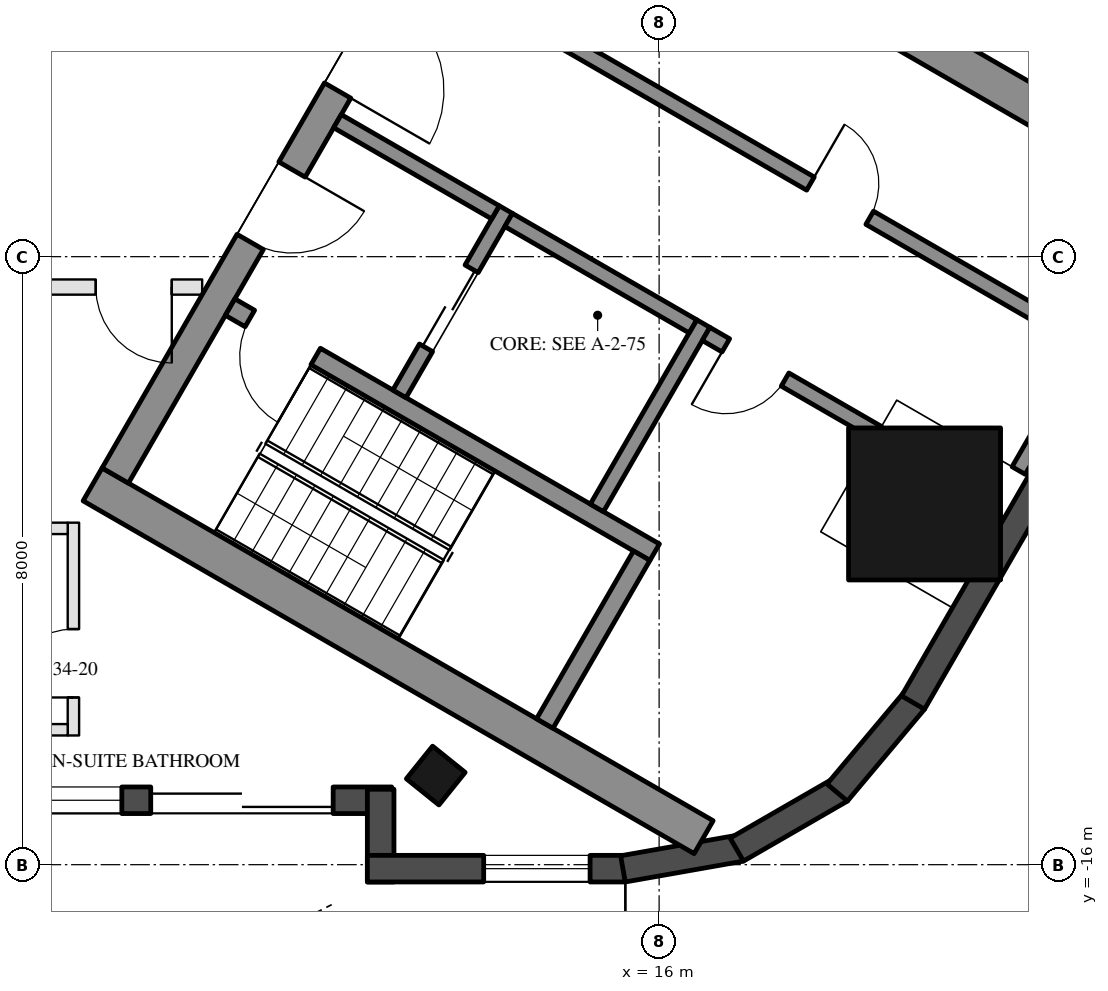
"""IFC4 building model, lengths in metres.
Left out: names, types, materials, properties, quantities, classifications, styles, units other than length and angle.
Written with IfcOpenShell. Run it as: python <this file> out.ifc"""

import sys

from ifc_helpers import new_model, si_unit, direction, frame, frame_2d, origin, origin_2d, place, context, subcontext, project, spatial, rectangle, hollow_rectangle, extrude, boolean, halfspace, element, fill, save


model = new_model("IFC4")
c1 = context("Model", 3, precision=1e-05, world=origin(), true_north=direction((0.0, 1.0)))
c2 = subcontext(c1, "Body", "Model", "MODEL_VIEW")
j1 = project(units=[si_unit("LENGTHUNIT", "METRE"), si_unit("PLANEANGLEUNIT", "RADIAN")], contexts=[c1])
p1 = place(None, origin())
s1 = spatial("IfcSite", under=j1, at=p1, CompositionType="ELEMENT")
p2 = place(p1, origin())
s2 = spatial("IfcBuilding", under=s1, at=p2, CompositionType="ELEMENT")
p3 = place(p2, frame((0.0, 0.0, 320.7)))
s3 = spatial("IfcBuildingStorey", under=s2, at=p3, CompositionType="ELEMENT", Elevation=320.7)
p4 = place(p3, frame((13.061, -14.827, 0.0), z_axis=(-0.121007284992, 0.150336498529, 0.981201393287), x_axis=(0.992609775631, 0.009249858451, 0.120996997646)))
e1 = element("IfcColumn", 1, at=p4, inside=s3, PredefinedType="COLUMN", context=c2, shape_type="SweptSolid", body=[
    boolean("DIFFERENCE", boolean("DIFFERENCE", extrude(hollow_rectangle(XDim=0.55, YDim=0.55, WallThickness=0.025, at=origin_2d()), origin(), (0.0, 0.0, 1.0), 3.771), halfspace(frame((0.0, 0.0, 0.04), z_axis=(0.0, 0.0, 1.0), x_axis=(1.0, 0.0, 0.0)), True)), halfspace(frame((0.0, 0.0, 3.731), z_axis=(0.0, 0.0, 1.0), x_axis=(1.0, 0.0, 0.0)), False)),
])
p5 = place(p3, frame((19.492, -11.254, 0.0), z_axis=(-0.190406849863, 0.109944185114, 0.975529347424), x_axis=(0.500043453909, 0.866000314205, 0.0)))
e2 = element("IfcColumn", 2, at=p5, inside=s3, PredefinedType="COLUMN", context=c2, shape_type="SweptSolid", body=[
    boolean("DIFFERENCE", boolean("DIFFERENCE", extrude(hollow_rectangle(XDim=2.0, YDim=2.0, WallThickness=0.05, at=origin_2d()), origin(), (0.0, 0.0, 1.0), 3.793), halfspace(frame((0.0, 0.0, 0.113), z_axis=(0.0, 0.0, 1.0), x_axis=(1.0, 0.0, 0.0)), True)), halfspace(frame((0.0, 0.0, 3.679), z_axis=(0.0, 0.0, 1.0), x_axis=(1.0, 0.0, 0.0)), False)),
])
p6 = place(p3, frame((7.111, -15.153, 0.0), z_axis=(0.0, 0.0, 1.0), x_axis=(1.0, 0.0, 0.0)))
e3 = element("IfcWall", 3, at=p6, inside=s3, PredefinedType="SOLIDWALL", context=c2, shape_type="SweptSolid", body=[
    extrude(rectangle(XDim=5.371, YDim=0.35, at=frame_2d((2.686, 0.0))), origin(), (0.0, 0.0, 1.0), 3.55),
])
p7 = place(p6, frame((2.201, 0.0, 0.0)))
e4 = element("IfcOpeningElement", 4, at=p7, cuts=e3, PredefinedType="OPENING", context=c2, shape_type="SweptSolid", body=[
    extrude(rectangle(XDim=2.4, YDim=2.4, at=frame_2d((1.2, 1.2))), frame((0.0, 0.185, 0.0), z_axis=(0.0, -1.0, 0.0), x_axis=(1.0, 0.0, 0.0)), (0.0, 0.0, 1.0), 0.37),
])
p8 = place(p6, frame((0.32, 0.0, 0.3)))
e5 = element("IfcOpeningElement", 5, at=p8, cuts=e3, PredefinedType="OPENING", context=c2, shape_type="SweptSolid", body=[
    extrude(rectangle(XDim=1.5, YDim=2.65, at=frame_2d((0.75, 1.325))), frame((0.0, 0.185, 0.0), z_axis=(0.0, -1.0, 0.0), x_axis=(1.0, 0.0, 0.0)), (0.0, 0.0, 1.0), 0.37),
])
p9 = place(p3, frame((12.336, -15.008, 0.0), z_axis=(0.0, 0.0, 1.0), x_axis=(0.0, -1.0, 0.0)))
e6 = element("IfcWall", 6, at=p9, inside=s3, PredefinedType="SOLIDWALL", context=c2, shape_type="SweptSolid", body=[
    extrude(rectangle(XDim=1.22, YDim=0.35, at=frame_2d((0.61, 0.0))), origin(), (0.0, 0.0, 1.0), 3.55),
])
p10 = place(p3, frame((12.161, -16.052, 0.0), z_axis=(0.0, 0.0, 1.0), x_axis=(1.0, 0.0, 0.0)))
e7 = element("IfcWall", 7, at=p10, inside=s3, PredefinedType="SOLIDWALL", context=c2, shape_type="SweptSolid", body=[
    extrude(rectangle(XDim=3.393, YDim=0.35, at=frame_2d((1.697, 0.0))), origin(), (0.0, 0.0, 1.0), 3.55),
])
p11 = place(p10, frame((1.531, 0.0, 0.3)))
e8 = element("IfcOpeningElement", 8, at=p11, cuts=e7, PredefinedType="OPENING", context=c2, shape_type="SweptSolid", body=[
    extrude(rectangle(XDim=1.4, YDim=2.65, at=frame_2d((0.7, 1.325))), frame((0.0, 0.185, 0.0), z_axis=(0.0, -1.0, 0.0), x_axis=(1.0, 0.0, 0.0)), (0.0, 0.0, 1.0), 0.37),
])
for number, where, z_axis, x_axis in (
    (9, (15.524, -16.055, 0.0), (0.0, 0.0, 1.0), (0.985, 0.174, 0.0)),
    (10, (17.022, -15.802, 0.0), (0.0, 0.0, 1.0), (0.866, 0.5, 0.0)),
    (11, (18.343, -15.051, 0.0), (0.0, 0.0, 1.0), (0.643, 0.766, 0.0)),
):
    element("IfcWall", number, at=place(p3, frame(where, z_axis=z_axis, x_axis=x_axis)), inside=s3, PredefinedType="SOLIDWALL", context=c2, shape_type="SweptSolid", body=[
        extrude(rectangle(XDim=1.579, YDim=0.35, at=frame_2d((0.79, 0.0))), origin(), (0.0, 0.0, 1.0), 3.55),
    ])
p12 = place(p3, frame((19.34, -13.867, 0.0), z_axis=(0.0, 0.0, 1.0), x_axis=(0.500023656998, 0.86601174498, 0.0)))
e12 = element("IfcWall", 12, at=p12, inside=s3, PredefinedType="SOLIDWALL", context=c2, shape_type="SweptSolid", body=[
    extrude(rectangle(XDim=4.677, YDim=0.35, at=frame_2d((2.339, 0.0))), origin(), (0.0, 0.0, 1.0), 3.55),
])
p13 = place(p3, frame((21.679, -5.444, 0.0), z_axis=(0.0, 0.0, 1.0), x_axis=(-0.500020587865, 0.866013517049, 0.0)))
e13 = element("IfcWall", 13, at=p13, inside=s3, PredefinedType="SOLIDWALL", context=c2, shape_type="SweptSolid", body=[
    extrude(rectangle(XDim=9.924, YDim=0.35, at=frame_2d((4.962, 0.0))), origin(), (0.0, 0.0, 1.0), 3.55),
])
p14 = place(p13, frame((0.381, 0.0, 0.3)))
e14 = element("IfcOpeningElement", 14, at=p14, cuts=e13, PredefinedType="OPENING", context=c2, shape_type="SweptSolid", body=[
    extrude(rectangle(XDim=1.3, YDim=2.65, at=frame_2d((0.65, 1.325))), frame((0.0, 0.185, 0.0), z_axis=(0.0, -1.0, 0.0), x_axis=(1.0, 0.0, 0.0)), (0.0, 0.0, 1.0), 0.37),
])
p15 = place(p13, frame((5.995, 0.0, 0.0)))
e15 = element("IfcOpeningElement", 15, at=p15, cuts=e13, PredefinedType="OPENING", context=c2, shape_type="SweptSolid", body=[
    extrude(rectangle(XDim=2.4, YDim=2.4, at=frame_2d((1.2, 1.2))), frame((0.0, 0.185, 0.0), z_axis=(0.0, -1.0, 0.0), x_axis=(1.0, 0.0, 0.0)), (0.0, 0.0, 1.0), 0.37),
])
p16 = place(p13, frame((3.579, 0.0, 0.3)))
e16 = element("IfcOpeningElement", 16, at=p16, cuts=e13, PredefinedType="OPENING", context=c2, shape_type="SweptSolid", body=[
    extrude(rectangle(XDim=2.1, YDim=2.65, at=frame_2d((1.05, 1.325))), frame((0.0, 0.185, 0.0), z_axis=(0.0, -1.0, 0.0), x_axis=(1.0, 0.0, 0.0)), (0.0, 0.0, 1.0), 0.37),
])
for number, where, z_axis, x_axis in (
    (17, (8.547, -10.997, 0.0), (0.0, 0.0, 1.0), (0.866, -0.5, 0.0)),
    (18, (13.797, -1.903, 0.0), (0.0, 0.0, 1.0), (0.866, -0.5, 0.0)),
):
    element("IfcWall", number, at=place(p3, frame(where, z_axis=z_axis, x_axis=x_axis)), inside=s3, PredefinedType="SHEAR", context=c2, shape_type="SweptSolid", body=[
        extrude(rectangle(XDim=9.283, YDim=0.5, at=frame_2d((4.641, 0.0))), origin(), (0.0, 0.0, 1.0), 3.5),
    ])
p17 = place(p3, frame((8.845, -10.88, 0.0), z_axis=(0.0, 0.0, 1.0), x_axis=(0.500004234368, 0.866022959057, 0.0)))
e19 = element("IfcWall", 19, at=p17, inside=s3, PredefinedType="SHEAR", context=c2, shape_type="SweptSolid", body=[
    extrude(rectangle(XDim=10.0, YDim=0.4, at=frame_2d((5.0, 0.0))), origin(), (0.0, 0.0, 1.0), 3.5),
])
p18 = place(p17, frame((3.55, 0.0, 0.0)))
e20 = element("IfcOpeningElement", 20, at=p18, cuts=e19, PredefinedType="OPENING", context=c2, shape_type="SweptSolid", body=[
    extrude(rectangle(XDim=1.1, YDim=2.1, at=frame_2d((0.55, 1.05))), frame((0.0, 0.21, 0.0), z_axis=(0.0, -1.0, 0.0), x_axis=(1.0, 0.0, 0.0)), (0.0, 0.0, 1.0), 0.42),
])
p19 = place(p17, frame((5.85, 0.0, 0.0)))
e21 = element("IfcOpeningElement", 21, at=p19, cuts=e19, PredefinedType="OPENING", context=c2, shape_type="SweptSolid", body=[
    extrude(rectangle(XDim=1.4, YDim=2.1, at=frame_2d((0.7, 1.05))), frame((0.0, 0.21, 0.0), z_axis=(0.0, -1.0, 0.0), x_axis=(1.0, 0.0, 0.0)), (0.0, 0.0, 1.0), 0.42),
])
p20 = place(p3, frame((10.356, -8.664, 0.0), z_axis=(0.0, 0.0, 1.0), x_axis=(0.866028629588, -0.499994412703, 0.0)))
e22 = element("IfcWall", 22, at=p20, inside=s3, PredefinedType="SHEAR", context=c2, shape_type="SweptSolid", body=[
    extrude(rectangle(XDim=6.45, YDim=0.25, at=frame_2d((3.225, 0.0))), origin(), (0.0, 0.0, 1.0), 3.5),
])
p21 = place(p20, frame((0.3, 0.0, 0.0)))
e23 = element("IfcOpeningElement", 23, at=p21, cuts=e22, PredefinedType="OPENING", context=c2, shape_type="SweptSolid", body=[
    extrude(rectangle(XDim=1.0, YDim=2.1, at=frame_2d((0.5, 1.05))), frame((0.0, 0.135, 0.0), z_axis=(0.0, -1.0, 0.0), x_axis=(1.0, 0.0, 0.0)), (0.0, 0.0, 1.0), 0.27),
])
p22 = place(p3, frame((14.496, -14.143, 0.0), z_axis=(0.0, 0.0, 1.0), x_axis=(0.500062241894, 0.865989465428, 0.0)))
e24 = element("IfcWall", 24, at=p22, inside=s3, PredefinedType="SHEAR", context=c2, shape_type="SweptSolid", body=[
    extrude(rectangle(XDim=2.55, YDim=0.25, at=frame_2d((1.275, 0.0))), origin(), (0.0, 0.0, 1.0), 3.5),
])
p23 = place(p3, frame((15.181, -11.305, 0.0), z_axis=(0.0, 0.0, 1.0), x_axis=(0.49994636267, 0.866056369097, 0.0)))
e25 = element("IfcWall", 25, at=p23, inside=s3, PredefinedType="SHEAR", context=c2, shape_type="SweptSolid", body=[
    extrude(rectangle(XDim=2.8, YDim=0.2, at=frame_2d((1.4, 0.0))), origin(), (0.0, 0.0, 1.0), 3.5),
])
p24 = place(p3, frame((12.583, -9.805, 0.0), z_axis=(0.0, 0.0, 1.0), x_axis=(0.49994636267, 0.866056369097, 0.0)))
e26 = element("IfcWall", 26, at=p24, inside=s3, PredefinedType="SHEAR", context=c2, shape_type="SweptSolid", body=[
    extrude(rectangle(XDim=2.8, YDim=0.2, at=frame_2d((1.4, 0.0))), origin(), (0.0, 0.0, 1.0), 3.5),
])
p25 = place(p24, frame((0.7, 0.0, 0.0)))
e27 = element("IfcOpeningElement", 27, at=p25, cuts=e26, PredefinedType="OPENING", context=c2, shape_type="SweptSolid", body=[
    extrude(rectangle(XDim=1.2, YDim=2.1, at=frame_2d((0.6, 1.05))), frame((0.0, 0.11, 0.0), z_axis=(0.0, -1.0, 0.0), x_axis=(1.0, 0.0, 0.0)), (0.0, 0.0, 1.0), 0.22),
])
p26 = place(p3, frame((11.768, -6.217, 0.0), z_axis=(0.0, 0.0, 1.0), x_axis=(0.866050077142, -0.499957262057, 0.0)))
e28 = element("IfcWall", 28, at=p26, inside=s3, PredefinedType="SHEAR", context=c2, shape_type="SweptSolid", body=[
    extrude(rectangle(XDim=2.4, YDim=0.2, at=frame_2d((1.2, 0.0))), origin(), (0.0, 0.0, 1.0), 3.5),
])
p27 = place(p3, frame((14.02, -7.517, 0.0), z_axis=(0.0, 0.0, 1.0), x_axis=(0.866034573852, -0.49998411664, 0.0)))
e29 = element("IfcWall", 29, at=p27, inside=s3, PredefinedType="SHEAR", context=c2, shape_type="SweptSolid", body=[
    extrude(rectangle(XDim=2.8, YDim=0.2, at=frame_2d((1.4, 0.0))), origin(), (0.0, 0.0, 1.0), 3.5),
])
p28 = place(p3, frame((12.968, -4.138, 0.0), z_axis=(0.0, 0.0, 1.0), x_axis=(0.866025710499, -0.499999468754, 0.0)))
e30 = element("IfcWall", 30, at=p28, inside=s3, PredefinedType="SHEAR", context=c2, shape_type="SweptSolid", body=[
    extrude(rectangle(XDim=10.121, YDim=0.2, at=frame_2d((5.061, 0.0))), origin(), (0.0, 0.0, 1.0), 3.5),
])
p29 = place(p28, frame((0.62, 0.0, 0.0)))
e31 = element("IfcOpeningElement", 31, at=p29, cuts=e30, PredefinedType="OPENING", context=c2, shape_type="SweptSolid", body=[
    extrude(rectangle(XDim=1.1, YDim=2.1, at=frame_2d((0.55, 1.05))), frame((0.0, 0.11, 0.0), z_axis=(0.0, -1.0, 0.0), x_axis=(1.0, 0.0, 0.0)), (0.0, 0.0, 1.0), 0.22),
])
p30 = place(p28, frame((5.8, 0.0, 0.0)))
e32 = element("IfcOpeningElement", 32, at=p30, cuts=e30, PredefinedType="OPENING", context=c2, shape_type="SweptSolid", body=[
    extrude(rectangle(XDim=0.9, YDim=2.1, at=frame_2d((0.45, 1.05))), frame((0.0, 0.11, 0.0), z_axis=(0.0, -1.0, 0.0), x_axis=(1.0, 0.0, 0.0)), (0.0, 0.0, 1.0), 0.22),
])
p31 = place(p3, frame((20.73, -10.814, 0.0), z_axis=(0.0, 0.0, 1.0), x_axis=(0.499961193289, 0.866047807691, 0.0)))
e33 = element("IfcWall", 33, at=p31, inside=s3, PredefinedType="SHEAR", context=c2, shape_type="SweptSolid", body=[
    extrude(rectangle(XDim=1.8, YDim=0.2, at=frame_2d((0.9, 0.0))), origin(), (0.0, 0.0, 1.0), 3.5),
])
p32 = place(p3, frame((16.618, -9.017, 0.0), z_axis=(0.0, 0.0, 1.0), x_axis=(0.866045268016, -0.499965592563, 0.0)))
e34 = element("IfcWall", 34, at=p32, inside=s3, PredefinedType="SHEAR", context=c2, shape_type="SweptSolid", body=[
    extrude(rectangle(XDim=2.608, YDim=0.2, at=frame_2d((1.304, 0.0))), origin(), (0.0, 0.0, 1.0), 3.5),
])
p33 = place(p32, frame((0.3, 0.0, 0.0)))
e35 = element("IfcOpeningElement", 35, at=p33, cuts=e34, PredefinedType="OPENING", context=c2, shape_type="SweptSolid", body=[
    extrude(rectangle(XDim=0.9, YDim=2.1, at=frame_2d((0.45, 1.05))), frame((0.0, 0.11, 0.0), z_axis=(0.0, -1.0, 0.0), x_axis=(1.0, 0.0, 0.0)), (0.0, 0.0, 1.0), 0.22),
])
p34 = place(p3, frame((15.131, -5.272, 0.0), z_axis=(0.0, 0.0, 1.0), x_axis=(0.499972520799, 0.866041268327, 0.0)))
e36 = element("IfcWall", 36, at=p34, inside=s3, PredefinedType="SHEAR", context=c2, shape_type="SweptSolid", body=[
    extrude(rectangle(XDim=2.0, YDim=0.2, at=frame_2d((1.0, 0.0))), origin(), (0.0, 0.0, 1.0), 3.5),
])
p35 = place(p3, frame((9.988, -8.4, 0.0), z_axis=(0.0, 0.0, 1.0), x_axis=(-1.0, 0.0, 0.0)))
e37 = element("IfcWall", 37, at=p35, inside=s3, PredefinedType="PARTITIONING", context=c2, shape_type="SweptSolid", body=[
    extrude(rectangle(XDim=3.794, YDim=0.2, at=frame_2d((1.897, 0.0))), origin(), (0.0, 0.0, 1.0), 3.15),
])
p36 = place(p35, frame((0.4, 0.0, 0.0)))
e38 = element("IfcOpeningElement", 38, at=p36, cuts=e37, PredefinedType="OPENING", context=c2, shape_type="SweptSolid", body=[
    extrude(rectangle(XDim=1.0, YDim=2.1, at=frame_2d((0.5, 1.05))), frame((0.0, 0.11, 0.0), z_axis=(0.0, -1.0, 0.0), x_axis=(1.0, 0.0, 0.0)), (0.0, 0.0, 1.0), 0.22),
])
p37 = place(p3, frame((8.294, -14.3, 0.0), z_axis=(0.0, 0.0, 1.0), x_axis=(0.0, 1.0, 0.0)))
e39 = element("IfcWall", 39, at=p37, inside=s3, PredefinedType="PARTITIONING", context=c2, shape_type="SweptSolid", body=[
    extrude(rectangle(XDim=2.8, YDim=0.15, at=frame_2d((1.4, 0.0))), origin(), (0.0, 0.0, 1.0), 3.1),
])
p38 = place(p37, frame((0.5, 0.0, 0.0)))
e40 = element("IfcOpeningElement", 40, at=p38, cuts=e39, PredefinedType="OPENING", context=c2, shape_type="SweptSolid", body=[
    extrude(rectangle(XDim=0.9, YDim=2.1, at=frame_2d((0.45, 1.05))), frame((0.0, 0.085, 0.0), z_axis=(0.0, -1.0, 0.0), x_axis=(1.0, 0.0, 0.0)), (0.0, 0.0, 1.0), 0.17),
])
p39 = place(p3, frame((6.534, -14.225, 0.0), z_axis=(0.0, 0.0, 1.0), x_axis=(1.0, 0.0, 0.0)))
e41 = element("IfcWall", 41, at=p39, inside=s3, PredefinedType="PARTITIONING", context=c2, shape_type="SweptSolid", body=[
    extrude(rectangle(XDim=1.685, YDim=0.15, at=frame_2d((0.842, 0.0))), origin(), (0.0, 0.0, 1.0), 3.1),
])
p40 = place(p3, frame((6.38, -11.575, 0.0), z_axis=(0.0, 0.0, 1.0), x_axis=(1.0, 0.0, 0.0)))
e42 = element("IfcWall", 42, at=p40, inside=s3, PredefinedType="PARTITIONING", context=c2, shape_type="SweptSolid", body=[
    extrude(rectangle(XDim=1.839, YDim=0.15, at=frame_2d((0.92, 0.0))), origin(), (0.0, 0.0, 1.0), 3.15),
])
p41 = place(p7, frame((2.4, 0.0, 0.0), z_axis=(0.0, 0.0, 1.0), x_axis=(-1.0, 0.0, 0.0)))
e43 = element("IfcDoor", 43, at=p41, inside=s3, OperationType="SLIDING_TO_LEFT", PredefinedType="DOOR", context=c2, shape_type="SweptSolid", body=[
    extrude(rectangle(XDim=2.4, YDim=2.4, at=frame_2d((1.2, 1.2))), frame((0.0, 0.025, 0.0), z_axis=(0.0, -1.0, 0.0), x_axis=(1.0, 0.0, 0.0)), (0.0, 0.0, 1.0), 0.05),
])
fill(e4, e43)
p42 = place(p8, origin())
e44 = element("IfcWindow", 44, at=p42, inside=s3, PartitioningType="SINGLE_PANEL", PredefinedType="WINDOW", context=c2, shape_type="SweptSolid", body=[
    extrude(rectangle(XDim=1.5, YDim=2.65, at=frame_2d((0.75, 1.325))), frame((0.0, 0.03, 0.0), z_axis=(0.0, -1.0, 0.0), x_axis=(1.0, 0.0, 0.0)), (0.0, 0.0, 1.0), 0.06),
])
fill(e5, e44)
p43 = place(p11, origin())
e45 = element("IfcWindow", 45, at=p43, inside=s3, PartitioningType="SINGLE_PANEL", PredefinedType="WINDOW", context=c2, shape_type="SweptSolid", body=[
    extrude(rectangle(XDim=1.4, YDim=2.65, at=frame_2d((0.7, 1.325))), frame((0.0, 0.03, 0.0), z_axis=(0.0, -1.0, 0.0), x_axis=(1.0, 0.0, 0.0)), (0.0, 0.0, 1.0), 0.06),
])
fill(e8, e45)
p44 = place(p25, origin())
e46 = element("IfcDoor", 46, at=p44, inside=s3, OperationType="DOUBLE_DOOR_SLIDING", PredefinedType="DOOR", context=c2, shape_type="SweptSolid", body=[
    extrude(rectangle(XDim=1.2, YDim=2.1, at=frame_2d((0.6, 1.05))), frame((0.0, 0.025, 0.0), z_axis=(0.0, -1.0, 0.0), x_axis=(1.0, 0.0, 0.0)), (0.0, 0.0, 1.0), 0.05),
])
fill(e27, e46)
p45 = place(p30, origin())
e47 = element("IfcDoor", 47, at=p45, inside=s3, OperationType="SINGLE_SWING_LEFT", PredefinedType="DOOR", context=c2, shape_type="SweptSolid", body=[
    extrude(rectangle(XDim=0.9, YDim=2.1, at=frame_2d((0.45, 1.05))), frame((0.0, 0.025, 0.0), z_axis=(0.0, -1.0, 0.0), x_axis=(1.0, 0.0, 0.0)), (0.0, 0.0, 1.0), 0.05),
])
fill(e32, e47)
p46 = place(p33, frame((0.9, 0.0, 0.0), z_axis=(0.0, 0.0, 1.0), x_axis=(-1.0, 0.0, 0.0)))
e48 = element("IfcDoor", 48, at=p46, inside=s3, OperationType="SINGLE_SWING_RIGHT", PredefinedType="DOOR", context=c2, shape_type="SweptSolid", body=[
    extrude(rectangle(XDim=0.9, YDim=2.1, at=frame_2d((0.45, 1.05))), frame((0.0, 0.025, 0.0), z_axis=(0.0, -1.0, 0.0), x_axis=(1.0, 0.0, 0.0)), (0.0, 0.0, 1.0), 0.05),
])
fill(e35, e48)
p47 = place(p18, frame((1.1, 0.0, 0.0), z_axis=(0.0, 0.0, 1.0), x_axis=(-1.0, 0.0, 0.0)))
e49 = element("IfcDoor", 49, at=p47, inside=s3, OperationType="SINGLE_SWING_LEFT", PredefinedType="DOOR", context=c2, shape_type="SweptSolid", body=[
    extrude(rectangle(XDim=1.1, YDim=2.1, at=frame_2d((0.55, 1.05))), frame((0.0, 0.025, 0.0), z_axis=(0.0, -1.0, 0.0), x_axis=(1.0, 0.0, 0.0)), (0.0, 0.0, 1.0), 0.05),
])
fill(e20, e49)
p48 = place(p19, frame((1.4, 0.0, 0.0), z_axis=(0.0, 0.0, 1.0), x_axis=(-1.0, 0.0, 0.0)))
e50 = element("IfcDoor", 50, at=p48, inside=s3, OperationType="DOUBLE_DOOR_SINGLE_SWING", PredefinedType="DOOR", context=c2, shape_type="SweptSolid", body=[
    extrude(rectangle(XDim=1.4, YDim=2.1, at=frame_2d((0.7, 1.05))), frame((0.0, 0.025, 0.0), z_axis=(0.0, -1.0, 0.0), x_axis=(1.0, 0.0, 0.0)), (0.0, 0.0, 1.0), 0.05),
])
fill(e21, e50)
p49 = place(p21, frame((1.0, 0.0, 0.0), z_axis=(0.0, 0.0, 1.0), x_axis=(-1.0, 0.0, 0.0)))
e51 = element("IfcDoor", 51, at=p49, inside=s3, OperationType="SINGLE_SWING_LEFT", PredefinedType="DOOR", context=c2, shape_type="SweptSolid", body=[
    extrude(rectangle(XDim=1.0, YDim=2.1, at=frame_2d((0.5, 1.05))), frame((0.0, 0.025, 0.0), z_axis=(0.0, -1.0, 0.0), x_axis=(1.0, 0.0, 0.0)), (0.0, 0.0, 1.0), 0.05),
])
fill(e23, e51)
p50 = place(p38, origin())
e52 = element("IfcDoor", 52, at=p50, inside=s3, OperationType="SINGLE_SWING_LEFT", PredefinedType="DOOR", context=c2, shape_type="SweptSolid", body=[
    extrude(rectangle(XDim=0.9, YDim=2.1, at=frame_2d((0.45, 1.05))), frame((0.0, 0.025, 0.0), z_axis=(0.0, -1.0, 0.0), x_axis=(1.0, 0.0, 0.0)), (0.0, 0.0, 1.0), 0.05),
])
fill(e40, e52)
p51 = place(p36, origin())
e53 = element("IfcDoor", 53, at=p51, inside=s3, OperationType="SINGLE_SWING_LEFT", PredefinedType="DOOR", context=c2, shape_type="SweptSolid", body=[
    extrude(rectangle(XDim=1.0, YDim=2.1, at=frame_2d((0.5, 1.05))), frame((0.0, 0.025, 0.0), z_axis=(0.0, -1.0, 0.0), x_axis=(1.0, 0.0, 0.0)), (0.0, 0.0, 1.0), 0.05),
])
fill(e38, e53)
save(model, sys.argv[1])
